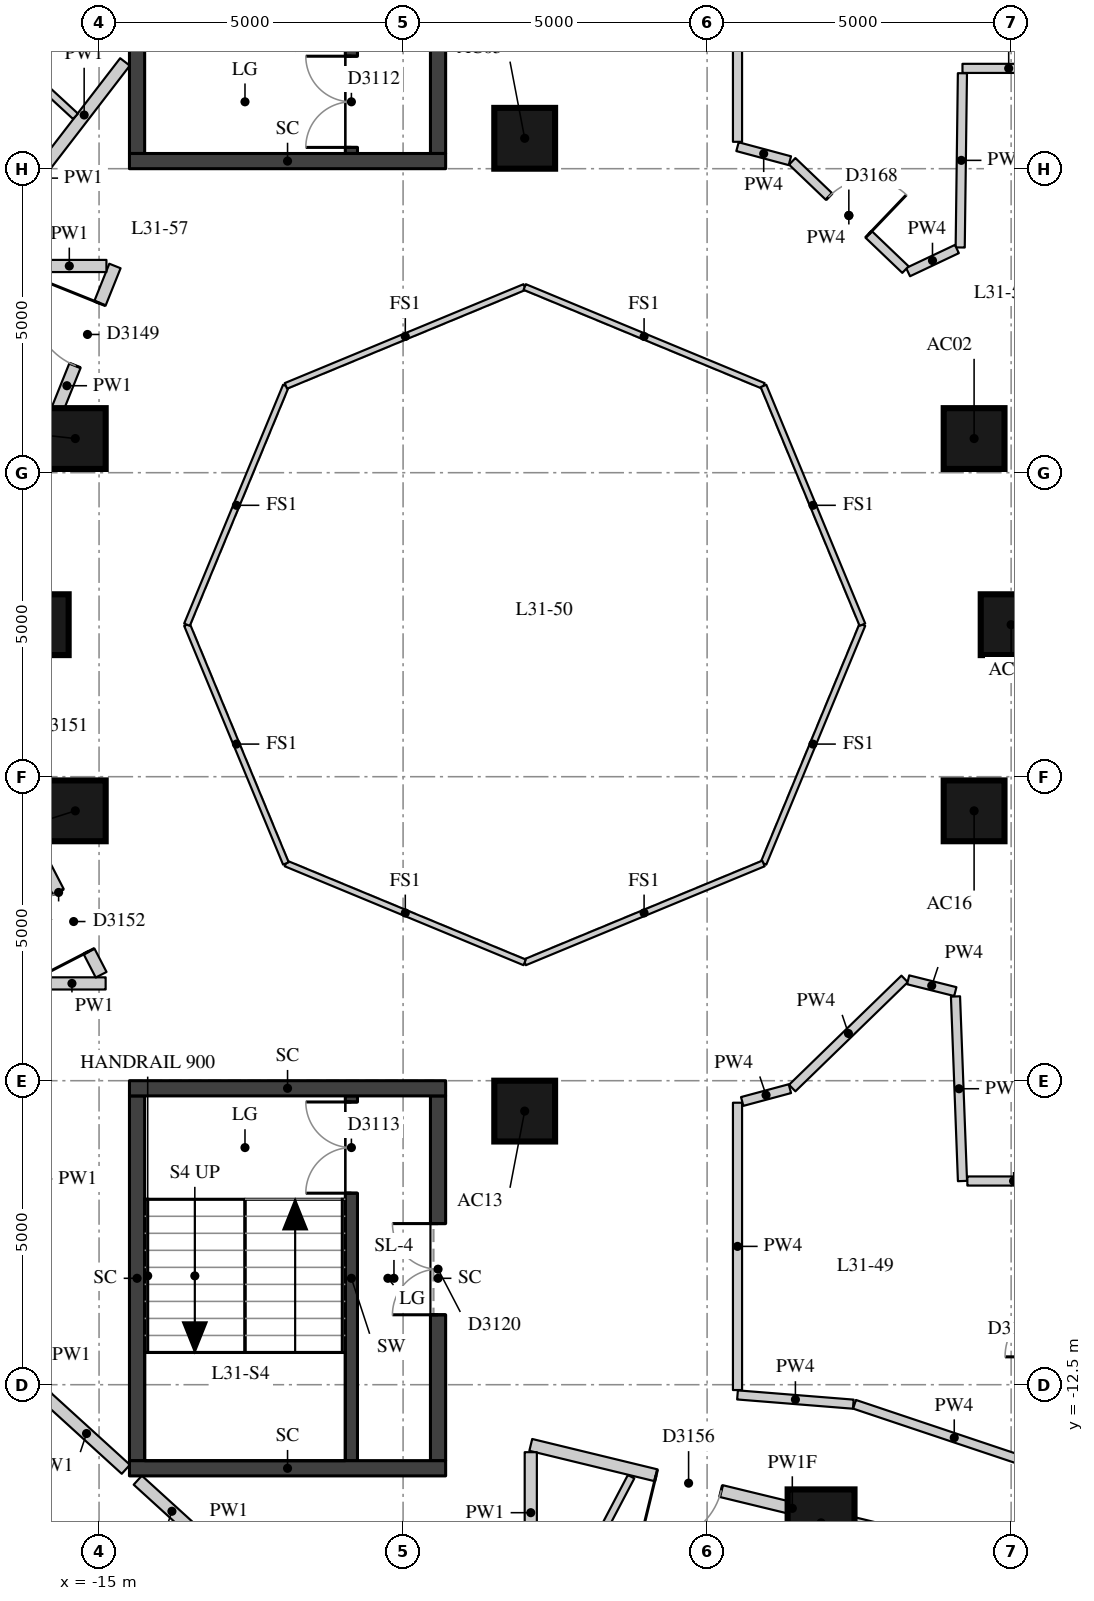
"""IFC4 building model, lengths in metres.
Left out: names, types, materials, properties, quantities, classifications, styles, units other than length and angle.
Written with IfcOpenShell. Run it as: python <this file> out.ifc"""

import sys

from ifc_helpers import new_model, si_unit, direction, frame, frame_2d, origin, origin_2d, place, context, subcontext, project, spatial, rectangle, extrude, element, fill, save


model = new_model("IFC4")
c1 = context("Model", 3, precision=1e-05, world=origin(), true_north=direction((0.0, 1.0)))
c2 = subcontext(c1, "Body", "Model", "MODEL_VIEW")
j1 = project(units=[si_unit("LENGTHUNIT", "METRE"), si_unit("PLANEANGLEUNIT", "RADIAN")], contexts=[c1])
p1 = place(None, origin())
s1 = spatial("IfcSite", under=j1, at=p1, CompositionType="ELEMENT")
p2 = place(p1, origin())
s2 = spatial("IfcBuilding", under=s1, at=p2, CompositionType="ELEMENT")
p3 = place(p2, frame((0.0, 0.0, 112.0)))
s3 = spatial("IfcBuildingStorey", under=s2, at=p3, CompositionType="ELEMENT", Elevation=112.0)
for number, where, z_axis, x_axis in (
    (1, (0.0, 0.0, 0.0), (0.0, 0.0, 1.0), (1.0, 0.0, 0.0)),
    (2, (-0.609, 3.062, 0.0), (0.0, 0.0, 1.0), (1.0, 0.0, 0.0)),
    (3, (-8.0, 8.0, 0.0), (0.0, 0.0, 1.0), (1.0, 0.0, 0.0)),
    (4, (-15.391, 3.062, 0.0), (0.0, 0.0, 1.0), (1.0, 0.0, 0.0)),
    (5, (-16.0, 0.0, 0.0), (0.0, 0.0, 1.0), (1.0, 0.0, 0.0)),
    (6, (-15.391, -3.062, 0.0), (0.0, 0.0, 1.0), (1.0, 0.0, 0.0)),
    (7, (-8.0, -8.0, 0.0), (0.0, 0.0, 1.0), (1.0, 0.0, 0.0)),
    (8, (-0.609, -3.062, 0.0), (0.0, 0.0, 1.0), (1.0, 0.0, 0.0)),
):
    element("IfcColumn", number, at=place(p3, frame(where, z_axis=z_axis, x_axis=x_axis)), inside=s3, PredefinedType="COLUMN", context=c2, shape_type="SweptSolid", body=[
        extrude(rectangle(XDim=1.0, YDim=1.0, at=origin_2d()), origin(), (0.0, 0.0, 1.0), 3.3),
    ])
p4 = place(p3, frame((-3.126, -14.772, 0.0), z_axis=(0.0, 0.0, 1.0), x_axis=(1.0, 0.0, 0.0)))
e9 = element("IfcColumn", 9, at=p4, inside=s3, PredefinedType="COLUMN", context=c2, shape_type="SweptSolid", body=[
    extrude(rectangle(XDim=1.1, YDim=1.1, at=origin_2d()), origin(), (0.0, 0.0, 1.0), 3.3),
])
p5 = place(p3, frame((-10.85, 7.75, 0.0), z_axis=(0.0, 0.0, 1.0), x_axis=(0.0, 1.0, 0.0)))
e10 = element("IfcWall", 10, at=p5, inside=s3, PredefinedType="SHEAR", context=c2, shape_type="SweptSolid", body=[
    extrude(rectangle(XDim=6.0, YDim=0.2, at=frame_2d((3.0, 0.0))), origin(), (0.0, 0.0, 1.0), 3.02),
])
p6 = place(p5, frame((0.1, 0.0, 0.0)))
e11 = element("IfcOpeningElement", 11, at=p6, cuts=e10, PredefinedType="OPENING", context=c2, shape_type="SweptSolid", body=[
    extrude(rectangle(XDim=1.5, YDim=2.1, at=frame_2d((0.75, 1.05))), frame((0.0, 0.11, 0.0), z_axis=(0.0, -1.0, 0.0), x_axis=(1.0, 0.0, 0.0)), (0.0, 0.0, 1.0), 0.22),
])
p7 = place(p3, frame((-10.85, -13.75, 0.0), z_axis=(0.0, 0.0, 1.0), x_axis=(0.0, 1.0, 0.0)))
e12 = element("IfcWall", 12, at=p7, inside=s3, PredefinedType="SHEAR", context=c2, shape_type="SweptSolid", body=[
    extrude(rectangle(XDim=6.0, YDim=0.2, at=frame_2d((3.0, 0.0))), origin(), (0.0, 0.0, 1.0), 3.02),
])
p8 = place(p7, frame((4.4, 0.0, 0.0)))
e13 = element("IfcOpeningElement", 13, at=p8, cuts=e12, PredefinedType="OPENING", context=c2, shape_type="SweptSolid", body=[
    extrude(rectangle(XDim=1.5, YDim=2.1, at=frame_2d((0.75, 1.05))), frame((0.0, 0.11, 0.0), z_axis=(0.0, -1.0, 0.0), x_axis=(1.0, 0.0, 0.0)), (0.0, 0.0, 1.0), 0.22),
])
p9 = place(p3, frame((-14.375, 7.75, -0.28), z_axis=(0.0, 0.0, 1.0), x_axis=(0.0, 1.0, 0.0)))
e14 = element("IfcWall", 14, at=p9, inside=s3, PredefinedType="SHEAR", context=c2, shape_type="SweptSolid", body=[
    extrude(rectangle(XDim=6.0, YDim=0.25, at=frame_2d((3.0, 0.0))), origin(), (0.0, 0.0, 1.0), 3.3),
])
p10 = place(p3, frame((-9.425, 7.75, -0.28), z_axis=(0.0, 0.0, 1.0), x_axis=(0.0, 1.0, 0.0)))
e15 = element("IfcWall", 15, at=p10, inside=s3, PredefinedType="SHEAR", context=c2, shape_type="SweptSolid", body=[
    extrude(rectangle(XDim=6.0, YDim=0.25, at=frame_2d((3.0, 0.0))), origin(), (0.0, 0.0, 1.0), 3.3),
])
p11 = place(p10, frame((2.1, 0.0, 0.28)))
e16 = element("IfcOpeningElement", 16, at=p11, cuts=e15, PredefinedType="OPENING", context=c2, shape_type="SweptSolid", body=[
    extrude(rectangle(XDim=1.5, YDim=2.1, at=frame_2d((0.75, 1.05))), frame((0.0, 0.135, 0.0), z_axis=(0.0, -1.0, 0.0), x_axis=(1.0, 0.0, 0.0)), (0.0, 0.0, 1.0), 0.27),
])
p12 = place(p3, frame((-14.5, 7.625, -0.28), z_axis=(0.0, 0.0, 1.0), x_axis=(1.0, 0.0, 0.0)))
e17 = element("IfcWall", 17, at=p12, inside=s3, PredefinedType="SHEAR", context=c2, shape_type="SweptSolid", body=[
    extrude(rectangle(XDim=5.2, YDim=0.25, at=frame_2d((2.6, 0.0))), origin(), (0.0, 0.0, 1.0), 3.3),
])
p13 = place(p3, frame((-14.375, -13.75, -0.28), z_axis=(0.0, 0.0, 1.0), x_axis=(0.0, 1.0, 0.0)))
e18 = element("IfcWall", 18, at=p13, inside=s3, PredefinedType="SHEAR", context=c2, shape_type="SweptSolid", body=[
    extrude(rectangle(XDim=6.0, YDim=0.25, at=frame_2d((3.0, 0.0))), origin(), (0.0, 0.0, 1.0), 3.3),
])
p14 = place(p3, frame((-9.425, -13.75, -0.28), z_axis=(0.0, 0.0, 1.0), x_axis=(0.0, 1.0, 0.0)))
e19 = element("IfcWall", 19, at=p14, inside=s3, PredefinedType="SHEAR", context=c2, shape_type="SweptSolid", body=[
    extrude(rectangle(XDim=6.0, YDim=0.25, at=frame_2d((3.0, 0.0))), origin(), (0.0, 0.0, 1.0), 3.3),
])
p15 = place(p14, frame((2.4, 0.0, 0.28)))
e20 = element("IfcOpeningElement", 20, at=p15, cuts=e19, PredefinedType="OPENING", context=c2, shape_type="SweptSolid", body=[
    extrude(rectangle(XDim=1.5, YDim=2.1, at=frame_2d((0.75, 1.05))), frame((0.0, 0.135, 0.0), z_axis=(0.0, -1.0, 0.0), x_axis=(1.0, 0.0, 0.0)), (0.0, 0.0, 1.0), 0.27),
])
for number, where, z_axis, x_axis in (
    (21, (-14.5, -7.625, -0.28), (0.0, 0.0, 1.0), (1.0, 0.0, 0.0)),
    (22, (-14.5, -13.875, -0.28), (0.0, 0.0, 1.0), (1.0, 0.0, 0.0)),
):
    element("IfcWall", number, at=place(p3, frame(where, z_axis=z_axis, x_axis=x_axis)), inside=s3, PredefinedType="SHEAR", context=c2, shape_type="SweptSolid", body=[
        extrude(rectangle(XDim=5.2, YDim=0.25, at=frame_2d((2.6, 0.0))), origin(), (0.0, 0.0, 1.0), 3.3),
    ])
p16 = place(p3, frame((-14.56, -13.891, 0.0), z_axis=(0.0, 0.0, 1.0), x_axis=(-0.739440483737, 0.673221932954, 0.0)))
e23 = element("IfcWall", 23, at=p16, inside=s3, PredefinedType="PARTITIONING", context=c2, shape_type="SweptSolid", body=[
    extrude(rectangle(XDim=1.748, YDim=0.2, at=frame_2d((0.874, 0.0))), origin(), (0.0, 0.0, 1.0), 3.02),
])
p17 = place(p3, frame((-16.0, -5.9, 0.0), z_axis=(0.0, 0.0, 1.0), x_axis=(1.0, 0.0, 0.0)))
e24 = element("IfcWall", 24, at=p17, inside=s3, PredefinedType="PARTITIONING", context=c2, shape_type="SweptSolid", body=[
    extrude(rectangle(XDim=1.108, YDim=0.2, at=frame_2d((0.554, 0.0))), origin(), (0.0, 0.0, 1.0), 3.02),
])
p18 = place(p3, frame((-14.966, -5.757, 0.0), z_axis=(0.0, 0.0, 1.0), x_axis=(-0.458904116107, 0.888485797422, 0.0)))
e25 = element("IfcWall", 25, at=p18, inside=s3, PredefinedType="PARTITIONING", context=c2, shape_type="SweptSolid", body=[
    extrude(rectangle(XDim=3.047, YDim=0.2, at=frame_2d((1.524, 0.0))), origin(), (0.0, 0.0, 1.0), 3.02),
])
p19 = place(p18, frame((0.435, 0.0, 0.0)))
e26 = element("IfcOpeningElement", 26, at=p19, cuts=e25, PredefinedType="OPENING", context=c2, shape_type="SweptSolid", body=[
    extrude(rectangle(XDim=1.1, YDim=2.1, at=frame_2d((0.55, 1.05))), frame((0.0, 0.11, 0.0), z_axis=(0.0, -1.0, 0.0), x_axis=(1.0, 0.0, 0.0)), (0.0, 0.0, 1.0), 0.22),
])
p20 = place(p3, frame((-16.319, 1.961, 0.0), z_axis=(0.0, 0.0, 1.0), x_axis=(0.372352515432, 0.928091377102, 0.0)))
e27 = element("IfcWall", 27, at=p20, inside=s3, PredefinedType="PARTITIONING", context=c2, shape_type="SweptSolid", body=[
    extrude(rectangle(XDim=4.244, YDim=0.2, at=frame_2d((2.122, 0.0))), origin(), (0.0, 0.0, 1.0), 3.02),
])
p21 = place(p20, frame((2.481, 0.0, 0.0)))
e28 = element("IfcOpeningElement", 28, at=p21, cuts=e27, PredefinedType="OPENING", context=c2, shape_type="SweptSolid", body=[
    extrude(rectangle(XDim=1.1, YDim=2.1, at=frame_2d((0.55, 1.05))), frame((0.0, 0.11, 0.0), z_axis=(0.0, -1.0, 0.0), x_axis=(1.0, 0.0, 0.0)), (0.0, 0.0, 1.0), 0.22),
])
p22 = place(p3, frame((-14.879, 5.9, 0.0), z_axis=(0.0, 0.0, 1.0), x_axis=(-1.0, 0.0, 0.0)))
e29 = element("IfcWall", 29, at=p22, inside=s3, PredefinedType="PARTITIONING", context=c2, shape_type="SweptSolid", body=[
    extrude(rectangle(XDim=1.221, YDim=0.2, at=frame_2d((0.611, 0.0))), origin(), (0.0, 0.0, 1.0), 3.02),
])
p23 = place(p3, frame((-15.917, 7.51, 0.0), z_axis=(0.0, 0.0, 1.0), x_axis=(0.609673267649, 0.792652828617, 0.0)))
e30 = element("IfcWall", 30, at=p23, inside=s3, PredefinedType="PARTITIONING", context=c2, shape_type="SweptSolid", body=[
    extrude(rectangle(XDim=2.203, YDim=0.2, at=frame_2d((1.102, 0.0))), origin(), (0.0, 0.0, 1.0), 3.02),
])
p24 = place(p3, frame((0.702, -15.577, 0.0), z_axis=(0.0, 0.0, 1.0), x_axis=(-0.971804733873, 0.235787105715, 0.0)))
e31 = element("IfcWall", 31, at=p24, inside=s3, PredefinedType="PARTITIONING", context=c2, shape_type="SweptSolid", body=[
    extrude(rectangle(XDim=8.852, YDim=0.2, at=frame_2d((4.426, 0.0))), origin(), (0.0, 0.0, 1.0), 2.42),
])
p25 = place(p24, frame((5.631, 0.0, 0.0)))
e32 = element("IfcOpeningElement", 32, at=p25, cuts=e31, PredefinedType="OPENING", context=c2, shape_type="SweptSolid", body=[
    extrude(rectangle(XDim=1.1, YDim=2.1, at=frame_2d((0.55, 1.05))), frame((0.0, 0.11, 0.0), z_axis=(0.0, -1.0, 0.0), x_axis=(1.0, 0.0, 0.0)), (0.0, 0.0, 1.0), 0.22),
])
p26 = place(p24, frame((1.863, 0.0, 0.0)))
e33 = element("IfcOpeningElement", 33, at=p26, cuts=e31, PredefinedType="OPENING", context=c2, shape_type="SweptSolid", body=[
    extrude(rectangle(XDim=1.0, YDim=2.1, at=frame_2d((0.5, 1.05))), frame((0.0, 0.11, 0.0), z_axis=(0.0, -1.0, 0.0), x_axis=(1.0, 0.0, 0.0)), (0.0, 0.0, 1.0), 0.22),
])
p27 = place(p3, frame((-7.9, -13.61, 0.0), z_axis=(0.0, 0.0, 1.0), x_axis=(0.0, -1.0, 0.0)))
e34 = element("IfcWall", 34, at=p27, inside=s3, PredefinedType="PARTITIONING", context=c2, shape_type="SweptSolid", body=[
    extrude(rectangle(XDim=1.99, YDim=0.2, at=frame_2d((0.995, 0.0))), origin(), (0.0, 0.0, 1.0), 3.02),
])
p28 = place(p3, frame((-13.24, -15.093, 0.0), z_axis=(0.0, 0.0, 1.0), x_axis=(-0.739438095557, 0.673224556028, 0.0)))
e35 = element("IfcWall", 35, at=p28, inside=s3, PredefinedType="PARTITIONING", context=c2, shape_type="SweptSolid", body=[
    extrude(rectangle(XDim=1.519, YDim=0.2, at=frame_2d((0.76, 0.0))), origin(), (0.0, 0.0, 1.0), 3.02),
])
p29 = place(p3, frame((0.72, 9.15, 0.0), z_axis=(0.0, 0.0, 1.0), x_axis=(-1.0, 0.0, 0.0)))
e36 = element("IfcWall", 36, at=p29, inside=s3, PredefinedType="PARTITIONING", context=c2, shape_type="SweptSolid", body=[
    extrude(rectangle(XDim=1.52, YDim=0.15, at=frame_2d((0.76, 0.0))), origin(), (0.0, 0.0, 1.0), 3.02),
])
p30 = place(p3, frame((-0.801, 9.07, 0.0), z_axis=(0.0, 0.0, 1.0), x_axis=(-0.012779053564, -0.999918344561, 0.0)))
e37 = element("IfcWall", 37, at=p30, inside=s3, PredefinedType="PARTITIONING", context=c2, shape_type="SweptSolid", body=[
    extrude(rectangle(XDim=2.866, YDim=0.15, at=frame_2d((1.433, 0.0))), origin(), (0.0, 0.0, 1.0), 3.02),
])
p31 = place(p3, frame((-0.892, 6.179, 0.0), z_axis=(0.0, 0.0, 1.0), x_axis=(-0.903944794982, -0.427649164181, 0.0)))
e38 = element("IfcWall", 38, at=p31, inside=s3, PredefinedType="PARTITIONING", context=c2, shape_type="SweptSolid", body=[
    extrude(rectangle(XDim=0.888, YDim=0.15, at=frame_2d((0.444, 0.0))), origin(), (0.0, 0.0, 1.0), 3.02),
])
p32 = place(p3, frame((-1.738, 5.841, 0.0), z_axis=(0.0, 0.0, 1.0), x_axis=(-0.722802374111, 0.691054793761, 0.0)))
e39 = element("IfcWall", 39, at=p32, inside=s3, PredefinedType="PARTITIONING", context=c2, shape_type="SweptSolid", body=[
    extrude(rectangle(XDim=2.576, YDim=0.15, at=frame_2d((1.288, 0.0))), origin(), (0.0, 0.0, 1.0), 3.02),
])
p33 = place(p32, frame((0.838, 0.0, 0.0)))
e40 = element("IfcOpeningElement", 40, at=p33, cuts=e39, PredefinedType="OPENING", context=c2, shape_type="SweptSolid", body=[
    extrude(rectangle(XDim=0.9, YDim=2.1, at=frame_2d((0.45, 1.05))), frame((0.0, 0.085, 0.0), z_axis=(0.0, -1.0, 0.0), x_axis=(1.0, 0.0, 0.0)), (0.0, 0.0, 1.0), 0.17),
])
p34 = place(p3, frame((-3.639, 7.631, 0.0), z_axis=(0.0, 0.0, 1.0), x_axis=(-0.965879594242, 0.258991523853, 0.0)))
e41 = element("IfcWall", 41, at=p34, inside=s3, PredefinedType="PARTITIONING", context=c2, shape_type="SweptSolid", body=[
    extrude(rectangle(XDim=0.892, YDim=0.15, at=frame_2d((0.446, 0.0))), origin(), (0.0, 0.0, 1.0), 3.02),
])
p35 = place(p3, frame((-4.5, 7.942, 0.0), z_axis=(0.0, 0.0, 1.0), x_axis=(0.0, 1.0, 0.0)))
e42 = element("IfcWall", 42, at=p35, inside=s3, PredefinedType="PARTITIONING", context=c2, shape_type="SweptSolid", body=[
    extrude(rectangle(XDim=3.292, YDim=0.15, at=frame_2d((1.646, 0.0))), origin(), (0.0, 0.0, 1.0), 3.02),
])
p36 = place(p3, frame((-3.6, -7.621, 0.0), z_axis=(0.0, 0.0, 1.0), x_axis=(0.717359204099, 0.696703503862, 0.0)))
e43 = element("IfcWall", 43, at=p36, inside=s3, PredefinedType="PARTITIONING", context=c2, shape_type="SweptSolid", body=[
    extrude(rectangle(XDim=2.577, YDim=0.15, at=frame_2d((1.288, 0.0))), origin(), (0.0, 0.0, 1.0), 3.02),
])
p37 = place(p3, frame((-1.694, -5.84, 0.0), z_axis=(0.0, 0.0, 1.0), x_axis=(0.970106576928, -0.242679272705, 0.0)))
e44 = element("IfcWall", 44, at=p37, inside=s3, PredefinedType="PARTITIONING", context=c2, shape_type="SweptSolid", body=[
    extrude(rectangle(XDim=0.8, YDim=0.15, at=frame_2d((0.4, 0.0))), origin(), (0.0, 0.0, 1.0), 3.02),
])
p38 = place(p3, frame((-0.915, -6.115, 0.0), z_axis=(0.0, 0.0, 1.0), x_axis=(0.037855898917, -0.999283208564, 0.0)))
e45 = element("IfcWall", 45, at=p38, inside=s3, PredefinedType="PARTITIONING", context=c2, shape_type="SweptSolid", body=[
    extrude(rectangle(XDim=3.038, YDim=0.15, at=frame_2d((1.519, 0.0))), origin(), (0.0, 0.0, 1.0), 3.02),
])
p39 = place(p3, frame((-0.72, -9.15, 0.0), z_axis=(0.0, 0.0, 1.0), x_axis=(1.0, 0.0, 0.0)))
e46 = element("IfcWall", 46, at=p39, inside=s3, PredefinedType="PARTITIONING", context=c2, shape_type="SweptSolid", body=[
    extrude(rectangle(XDim=1.52, YDim=0.15, at=frame_2d((0.76, 0.0))), origin(), (0.0, 0.0, 1.0), 3.02),
])
p40 = place(p3, frame((0.705, -13.922, 0.0), z_axis=(0.0, 0.0, 1.0), x_axis=(-0.948131483463, 0.317878420258, 0.0)))
e47 = element("IfcWall", 47, at=p40, inside=s3, PredefinedType="PARTITIONING", context=c2, shape_type="SweptSolid", body=[
    extrude(rectangle(XDim=3.46, YDim=0.15, at=frame_2d((1.73, 0.0))), origin(), (0.0, 0.0, 1.0), 3.02),
])
p41 = place(p3, frame((-2.596, -12.82, 0.0), z_axis=(0.0, 0.0, 1.0), x_axis=(-0.996815278536, 0.079745222283, 0.0)))
e48 = element("IfcWall", 48, at=p41, inside=s3, PredefinedType="PARTITIONING", context=c2, shape_type="SweptSolid", body=[
    extrude(rectangle(XDim=1.91, YDim=0.15, at=frame_2d((0.955, 0.0))), origin(), (0.0, 0.0, 1.0), 3.02),
])
p42 = place(p3, frame((-4.5, -12.588, 0.0), z_axis=(0.0, 0.0, 1.0), x_axis=(0.0, 1.0, 0.0)))
e49 = element("IfcWall", 49, at=p42, inside=s3, PredefinedType="PARTITIONING", context=c2, shape_type="SweptSolid", body=[
    extrude(rectangle(XDim=4.726, YDim=0.15, at=frame_2d((2.363, 0.0))), origin(), (0.0, 0.0, 1.0), 3.02),
])
p43 = place(p3, frame((-4.423, -7.842, 0.0), z_axis=(0.0, 0.0, 1.0), x_axis=(0.96582447955, 0.259196980502, 0.0)))
e50 = element("IfcWall", 50, at=p43, inside=s3, PredefinedType="PARTITIONING", context=c2, shape_type="SweptSolid", body=[
    extrude(rectangle(XDim=0.812, YDim=0.15, at=frame_2d((0.406, 0.0))), origin(), (0.0, 0.0, 1.0), 3.02),
])
p44 = place(p3, frame((-15.387, 8.362, 0.0), z_axis=(0.0, 0.0, 1.0), x_axis=(-0.735313004993, 0.677727662626, 0.0)))
e51 = element("IfcWall", 51, at=p44, inside=s3, PredefinedType="PARTITIONING", context=c2, shape_type="SweptSolid", body=[
    extrude(rectangle(XDim=2.497, YDim=0.12, at=frame_2d((1.249, 0.0))), origin(), (0.0, 0.0, 1.0), 3.02),
])
p45 = place(p3, frame((-6.25, -14.013, 0.0), z_axis=(0.0, 0.0, 1.0), x_axis=(-0.465288210927, -0.885159240347, 0.0)))
e52 = element("IfcWall", 52, at=p45, inside=s3, PredefinedType="PARTITIONING", context=c2, shape_type="SweptSolid", body=[
    extrude(rectangle(XDim=5.644, YDim=0.12, at=frame_2d((2.822, 0.0))), origin(), (0.0, 0.0, 1.0), 3.02),
])
for number, where, z_axis, x_axis in (
    (53, (-2.446, 0.0, 0.0), (0.0, 0.0, 1.0), (-0.383, -0.924, 0.0)),
    (54, (-4.073, -3.927, 0.0), (0.0, 0.0, 1.0), (-0.924, -0.383, 0.0)),
    (55, (-8.0, -5.554, 0.0), (0.0, 0.0, 1.0), (-0.924, 0.383, 0.0)),
    (56, (-11.927, -3.927, 0.0), (0.0, 0.0, 1.0), (-0.383, 0.924, 0.0)),
    (57, (-13.554, 0.0, 0.0), (0.0, 0.0, 1.0), (0.383, 0.924, 0.0)),
    (58, (-11.927, 3.927, 0.0), (0.0, 0.0, 1.0), (0.924, 0.383, 0.0)),
    (59, (-8.0, 5.554, 0.0), (0.0, 0.0, 1.0), (0.924, -0.383, 0.0)),
    (60, (-4.073, 3.927, 0.0), (0.0, 0.0, 1.0), (0.383, -0.924, 0.0)),
):
    element("IfcWall", number, at=place(p3, frame(where, z_axis=z_axis, x_axis=x_axis)), inside=s3, PredefinedType="PARTITIONING", context=c2, shape_type="SweptSolid", body=[
        extrude(rectangle(XDim=4.251, YDim=0.1, at=frame_2d((2.125, 0.0))), origin(), (0.0, 0.0, 1.0), 3.02),
    ])
p46 = place(p6, origin())
e61 = element("IfcDoor", 61, at=p46, inside=s3, OperationType="DOUBLE_DOOR_SINGLE_SWING", PredefinedType="DOOR", context=c2, shape_type="SweptSolid", body=[
    extrude(rectangle(XDim=1.5, YDim=2.1, at=frame_2d((0.75, 1.05))), frame((0.0, 0.025, 0.0), z_axis=(0.0, -1.0, 0.0), x_axis=(1.0, 0.0, 0.0)), (0.0, 0.0, 1.0), 0.05),
])
fill(e11, e61)
p47 = place(p8, origin())
e62 = element("IfcDoor", 62, at=p47, inside=s3, OperationType="DOUBLE_DOOR_SINGLE_SWING", PredefinedType="DOOR", context=c2, shape_type="SweptSolid", body=[
    extrude(rectangle(XDim=1.5, YDim=2.1, at=frame_2d((0.75, 1.05))), frame((0.0, 0.025, 0.0), z_axis=(0.0, -1.0, 0.0), x_axis=(1.0, 0.0, 0.0)), (0.0, 0.0, 1.0), 0.05),
])
fill(e13, e62)
p48 = place(p15, origin())
e63 = element("IfcDoor", 63, at=p48, inside=s3, OperationType="DOUBLE_DOOR_SINGLE_SWING", PredefinedType="DOOR", context=c2, shape_type="SweptSolid", body=[
    extrude(rectangle(XDim=1.5, YDim=2.1, at=frame_2d((0.75, 1.05))), frame((0.0, 0.025, 0.0), z_axis=(0.0, -1.0, 0.0), x_axis=(1.0, 0.0, 0.0)), (0.0, 0.0, 1.0), 0.05),
])
fill(e20, e63)
p49 = place(p21, origin())
e64 = element("IfcDoor", 64, at=p49, inside=s3, OperationType="SINGLE_SWING_RIGHT", PredefinedType="DOOR", context=c2, shape_type="SweptSolid", body=[
    extrude(rectangle(XDim=1.1, YDim=2.1, at=frame_2d((0.55, 1.05))), frame((0.0, 0.025, 0.0), z_axis=(0.0, -1.0, 0.0), x_axis=(1.0, 0.0, 0.0)), (0.0, 0.0, 1.0), 0.05),
])
fill(e28, e64)
p50 = place(p19, origin())
e65 = element("IfcDoor", 65, at=p50, inside=s3, OperationType="SINGLE_SWING_LEFT", PredefinedType="DOOR", context=c2, shape_type="SweptSolid", body=[
    extrude(rectangle(XDim=1.1, YDim=2.1, at=frame_2d((0.55, 1.05))), frame((0.0, 0.025, 0.0), z_axis=(0.0, -1.0, 0.0), x_axis=(1.0, 0.0, 0.0)), (0.0, 0.0, 1.0), 0.05),
])
fill(e26, e65)
p51 = place(p25, origin())
e66 = element("IfcDoor", 66, at=p51, inside=s3, OperationType="SINGLE_SWING_RIGHT", PredefinedType="DOOR", context=c2, shape_type="SweptSolid", body=[
    extrude(rectangle(XDim=1.1, YDim=2.1, at=frame_2d((0.55, 1.05))), frame((0.0, 0.025, 0.0), z_axis=(0.0, -1.0, 0.0), x_axis=(1.0, 0.0, 0.0)), (0.0, 0.0, 1.0), 0.05),
])
fill(e32, e66)
p52 = place(p33, origin())
e67 = element("IfcDoor", 67, at=p52, inside=s3, OperationType="SINGLE_SWING_RIGHT", PredefinedType="DOOR", context=c2, shape_type="SweptSolid", body=[
    extrude(rectangle(XDim=0.9, YDim=2.1, at=frame_2d((0.45, 1.05))), frame((0.0, 0.025, 0.0), z_axis=(0.0, -1.0, 0.0), x_axis=(1.0, 0.0, 0.0)), (0.0, 0.0, 1.0), 0.05),
])
fill(e40, e67)
save(model, sys.argv[1])
